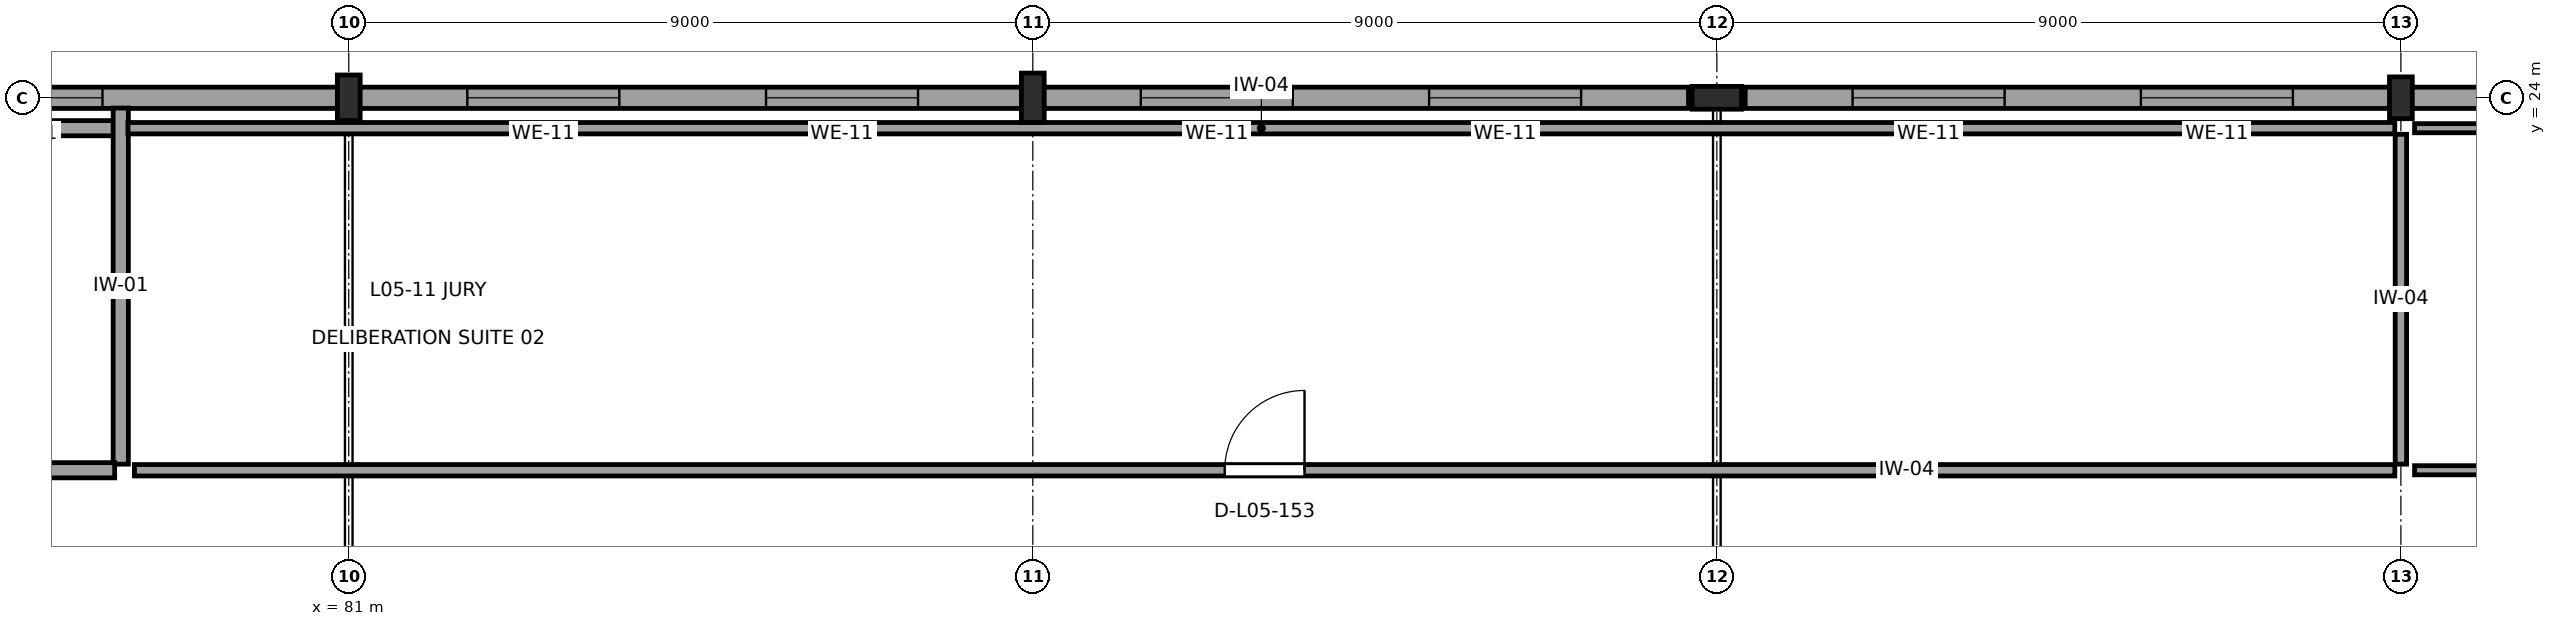
"""IFC4 building model, lengths in metres.
Left out: names, types, materials, properties, quantities, classifications, styles, units other than length and angle.
Written with IfcOpenShell. Run it as: python <this file> out.ifc"""

import sys

from ifc_helpers import new_model, si_unit, direction, frame, frame_2d, origin, origin_2d, place, context, subcontext, project, spatial, rectangle, i_section, extrude, element, fill, save


model = new_model("IFC4")
c1 = context("Model", 3, precision=1e-05, world=origin(), true_north=direction((0.0, 1.0)))
c2 = subcontext(c1, "Body", "Model", "MODEL_VIEW")
j1 = project(units=[si_unit("LENGTHUNIT", "METRE"), si_unit("PLANEANGLEUNIT", "RADIAN")], contexts=[c1])
p1 = place(None, origin())
s1 = spatial("IfcSite", under=j1, at=p1, CompositionType="ELEMENT")
p2 = place(p1, origin())
s2 = spatial("IfcBuilding", under=s1, at=p2, CompositionType="ELEMENT")
p3 = place(p2, frame((0.0, 0.0, 23.4)))
s3 = spatial("IfcBuildingStorey", under=s2, at=p3, CompositionType="ELEMENT", Elevation=23.4)
p4 = place(p3, frame((81.0, 24.0, 0.0), z_axis=(0.0, 0.0, 1.0), x_axis=(1.0, 0.0, 0.0)))
e1 = element("IfcColumn", 1, at=p4, inside=s3, PredefinedType="COLUMN", context=c2, shape_type="SweptSolid", body=[
    extrude(i_section(OverallWidth=0.3, OverallDepth=0.6, WebThickness=0.015, FlangeThickness=0.03, at=origin_2d()), origin(), (0.0, 0.0, 1.0), 4.0),
])
for number, where, z_axis, x_axis in (
    (2, (90.0, 24.0, 0.0), (0.0, 0.0, 1.0), (1.0, 0.0, 0.0)),
    (3, (99.0, 24.0, 0.0), (0.0, 0.0, 1.0), (0.0, 1.0, 0.0)),
):
    element("IfcColumn", number, at=place(p3, frame(where, z_axis=z_axis, x_axis=x_axis)), inside=s3, PredefinedType="COLUMN", context=c2, shape_type="SweptSolid", body=[
        extrude(i_section(OverallWidth=0.3, OverallDepth=0.65, WebThickness=0.016, FlangeThickness=0.031, at=origin_2d()), origin(), (0.0, 0.0, 1.0), 4.0),
    ])
p5 = place(p3, frame((108.0, 24.0, 0.0), z_axis=(0.0, 0.0, 1.0), x_axis=(1.0, 0.0, 0.0)))
e4 = element("IfcColumn", 4, at=p5, inside=s3, PredefinedType="COLUMN", context=c2, shape_type="SweptSolid", body=[
    extrude(i_section(OverallWidth=0.3, OverallDepth=0.55, WebThickness=0.015, FlangeThickness=0.029, at=origin_2d()), origin(), (0.0, 0.0, 1.0), 4.0),
])
p6 = place(p3, frame((80.942, 24.0, 0.0), z_axis=(0.0, 0.0, 1.0), x_axis=(-1.0, 0.0, 0.0)))
e5 = element("IfcWall", 5, at=p6, inside=s3, PredefinedType="SOLIDWALL", context=c2, shape_type="SweptSolid", body=[
    extrude(rectangle(XDim=8.934, YDim=0.28, at=frame_2d((4.467, 0.0))), origin(), (0.0, 0.0, 1.0), 3.315),
])
p7 = place(p6, frame((3.182, 0.0, 0.85)))
e6 = element("IfcOpeningElement", 6, at=p7, cuts=e5, PredefinedType="OPENING", context=c2, shape_type="SweptSolid", body=[
    extrude(rectangle(XDim=2.0, YDim=2.0, at=frame_2d((1.0, 1.0))), frame((0.0, 0.155, 0.0), z_axis=(0.0, -1.0, 0.0), x_axis=(1.0, 0.0, 0.0)), (0.0, 0.0, 1.0), 0.31),
])
p8 = place(p3, frame((98.627, 24.0, 0.0), z_axis=(0.0, 0.0, 1.0), x_axis=(-1.0, 0.0, 0.0)))
e7 = element("IfcWall", 7, at=p8, inside=s3, PredefinedType="SOLIDWALL", context=c2, shape_type="SweptSolid", body=[
    extrude(rectangle(XDim=8.619, YDim=0.28, at=frame_2d((4.31, 0.0))), origin(), (0.0, 0.0, 1.0), 3.315),
])
p9 = place(p8, frame((1.413, 0.0, 0.85)))
e8 = element("IfcOpeningElement", 8, at=p9, cuts=e7, PredefinedType="OPENING", context=c2, shape_type="SweptSolid", body=[
    extrude(rectangle(XDim=2.0, YDim=2.0, at=frame_2d((1.0, 1.0))), frame((0.0, 0.155, 0.0), z_axis=(0.0, -1.0, 0.0), x_axis=(1.0, 0.0, 0.0)), (0.0, 0.0, 1.0), 0.31),
])
p10 = place(p8, frame((5.206, 0.0, 0.85)))
e9 = element("IfcOpeningElement", 9, at=p10, cuts=e7, PredefinedType="OPENING", context=c2, shape_type="SweptSolid", body=[
    extrude(rectangle(XDim=2.0, YDim=2.0, at=frame_2d((1.0, 1.0))), frame((0.0, 0.155, 0.0), z_axis=(0.0, -1.0, 0.0), x_axis=(1.0, 0.0, 0.0)), (0.0, 0.0, 1.0), 0.31),
])
p11 = place(p3, frame((89.992, 24.0, 0.0), z_axis=(0.0, 0.0, 1.0), x_axis=(-1.0, 0.0, 0.0)))
e10 = element("IfcWall", 10, at=p11, inside=s3, PredefinedType="SOLIDWALL", context=c2, shape_type="SweptSolid", body=[
    extrude(rectangle(XDim=8.934, YDim=0.28, at=frame_2d((4.467, 0.0))), origin(), (0.0, 0.0, 1.0), 3.315),
])
p12 = place(p11, frame((1.502, 0.0, 0.85)))
e11 = element("IfcOpeningElement", 11, at=p12, cuts=e10, PredefinedType="OPENING", context=c2, shape_type="SweptSolid", body=[
    extrude(rectangle(XDim=2.0, YDim=2.0, at=frame_2d((1.0, 1.0))), frame((0.0, 0.155, 0.0), z_axis=(0.0, -1.0, 0.0), x_axis=(1.0, 0.0, 0.0)), (0.0, 0.0, 1.0), 0.31),
])
p13 = place(p11, frame((5.432, 0.0, 0.85)))
e12 = element("IfcOpeningElement", 12, at=p13, cuts=e10, PredefinedType="OPENING", context=c2, shape_type="SweptSolid", body=[
    extrude(rectangle(XDim=2.0, YDim=2.0, at=frame_2d((1.0, 1.0))), frame((0.0, 0.155, 0.0), z_axis=(0.0, -1.0, 0.0), x_axis=(1.0, 0.0, 0.0)), (0.0, 0.0, 1.0), 0.31),
])
p14 = place(p3, frame((116.992, 24.0, 0.0), z_axis=(0.0, 0.0, 1.0), x_axis=(-1.0, 0.0, 0.0)))
e13 = element("IfcWall", 13, at=p14, inside=s3, PredefinedType="SOLIDWALL", context=c2, shape_type="SweptSolid", body=[
    extrude(rectangle(XDim=8.984, YDim=0.28, at=frame_2d((4.492, 0.0))), origin(), (0.0, 0.0, 1.0), 2.747),
])
p15 = place(p14, frame((2.045, 0.0, 0.9)))
e14 = element("IfcOpeningElement", 14, at=p15, cuts=e13, PredefinedType="OPENING", context=c2, shape_type="SweptSolid", body=[
    extrude(rectangle(XDim=1.3, YDim=1.3, at=frame_2d((0.65, 0.65))), frame((0.0, 0.155, 0.0), z_axis=(0.0, -1.0, 0.0), x_axis=(1.0, 0.0, 0.0)), (0.0, 0.0, 1.0), 0.31),
])
p16 = place(p14, frame((5.639, 0.0, 0.9)))
e15 = element("IfcOpeningElement", 15, at=p16, cuts=e13, PredefinedType="OPENING", context=c2, shape_type="SweptSolid", body=[
    extrude(rectangle(XDim=1.3, YDim=1.3, at=frame_2d((0.65, 0.65))), frame((0.0, 0.155, 0.0), z_axis=(0.0, -1.0, 0.0), x_axis=(1.0, 0.0, 0.0)), (0.0, 0.0, 1.0), 0.31),
])
p17 = place(p3, frame((107.992, 24.0, 0.0), z_axis=(0.0, 0.0, 1.0), x_axis=(-1.0, 0.0, 0.0)))
e16 = element("IfcWall", 16, at=p17, inside=s3, PredefinedType="SOLIDWALL", context=c2, shape_type="SweptSolid", body=[
    extrude(rectangle(XDim=8.619, YDim=0.28, at=frame_2d((4.31, 0.0))), origin(), (0.0, 0.0, 1.0), 3.315),
])
p18 = place(p17, frame((1.413, 0.0, 0.85)))
e17 = element("IfcOpeningElement", 17, at=p18, cuts=e16, PredefinedType="OPENING", context=c2, shape_type="SweptSolid", body=[
    extrude(rectangle(XDim=2.0, YDim=2.0, at=frame_2d((1.0, 1.0))), frame((0.0, 0.155, 0.0), z_axis=(0.0, -1.0, 0.0), x_axis=(1.0, 0.0, 0.0)), (0.0, 0.0, 1.0), 0.31),
])
p19 = place(p17, frame((5.206, 0.0, 0.85)))
e18 = element("IfcOpeningElement", 18, at=p19, cuts=e16, PredefinedType="OPENING", context=c2, shape_type="SweptSolid", body=[
    extrude(rectangle(XDim=2.0, YDim=2.0, at=frame_2d((1.0, 1.0))), frame((0.0, 0.155, 0.0), z_axis=(0.0, -1.0, 0.0), x_axis=(1.0, 0.0, 0.0)), (0.0, 0.0, 1.0), 0.31),
])
p20 = place(p3, frame((45.008, 23.6, 0.0), z_axis=(0.0, 0.0, 1.0), x_axis=(1.0, 0.0, 0.0)))
e19 = element("IfcWall", 19, at=p20, inside=s3, PredefinedType="PARTITIONING", context=c2, shape_type="SweptSolid", body=[
    extrude(rectangle(XDim=32.912, YDim=0.2, at=frame_2d((16.456, 0.0))), origin(), (0.0, 0.0, 1.0), 3.64),
])
p21 = place(p3, frame((78.0, 23.865, 0.0), z_axis=(0.0, 0.0, 1.0), x_axis=(0.0, -1.0, 0.0)))
e20 = element("IfcWall", 20, at=p21, inside=s3, PredefinedType="PARTITIONING", context=c2, shape_type="SweptSolid", body=[
    extrude(rectangle(XDim=4.685, YDim=0.2, at=frame_2d((2.343, 0.0))), origin(), (0.0, 0.0, 1.0), 3.555),
])
p22 = place(p3, frame((77.92, 19.1, 0.0), z_axis=(0.0, 0.0, 1.0), x_axis=(-1.0, 0.0, 0.0)))
e21 = element("IfcWall", 21, at=p22, inside=s3, PredefinedType="PARTITIONING", context=c2, shape_type="SweptSolid", body=[
    extrude(rectangle(XDim=32.785, YDim=0.2, at=frame_2d((16.393, 0.0))), origin(), (0.0, 0.0, 1.0), 3.64),
])
p23 = place(p22, frame((15.442, 0.0, 0.0)))
e22 = element("IfcOpeningElement", 22, at=p23, cuts=e21, PredefinedType="OPENING", context=c2, shape_type="SweptSolid", body=[
    extrude(rectangle(XDim=1.9, YDim=2.5, at=frame_2d((0.95, 1.25))), frame((0.0, 0.115, 0.0), z_axis=(0.0, -1.0, 0.0), x_axis=(1.0, 0.0, 0.0)), (0.0, 0.0, 1.0), 0.23),
])
p24 = place(p3, frame((108.0, 23.52, 0.0), z_axis=(0.0, 0.0, 1.0), x_axis=(0.0, -1.0, 0.0)))
e23 = element("IfcWall", 23, at=p24, inside=s3, PredefinedType="PARTITIONING", context=c2, shape_type="SweptSolid", body=[
    extrude(rectangle(XDim=4.34, YDim=0.15, at=frame_2d((2.17, 0.0))), origin(), (0.0, 0.0, 1.0), 3.405),
])
p25 = place(p3, frame((107.92, 19.1, 0.0), z_axis=(0.0, 0.0, 1.0), x_axis=(-1.0, 0.0, 0.0)))
e24 = element("IfcWall", 24, at=p25, inside=s3, PredefinedType="PARTITIONING", context=c2, shape_type="SweptSolid", body=[
    extrude(rectangle(XDim=29.74, YDim=0.15, at=frame_2d((14.87, 0.0))), origin(), (0.0, 0.0, 1.0), 3.64),
])
p26 = place(p25, frame((14.345, 0.0, 0.0)))
e25 = element("IfcOpeningElement", 25, at=p26, cuts=e24, PredefinedType="OPENING", context=c2, shape_type="SweptSolid", body=[
    extrude(rectangle(XDim=1.05, YDim=2.25, at=frame_2d((0.525, 1.125))), frame((0.0, 0.09, 0.0), z_axis=(0.0, -1.0, 0.0), x_axis=(1.0, 0.0, 0.0)), (0.0, 0.0, 1.0), 0.18),
])
p27 = place(p3, frame((78.095, 23.6, 0.0), z_axis=(0.0, 0.0, 1.0), x_axis=(1.0, 0.0, 0.0)))
e26 = element("IfcWall", 26, at=p27, inside=s3, PredefinedType="PARTITIONING", context=c2, shape_type="SweptSolid", body=[
    extrude(rectangle(XDim=29.825, YDim=0.15, at=frame_2d((14.913, 0.0))), origin(), (0.0, 0.0, 1.0), 3.64),
])
p28 = place(p3, frame((147.465, 19.1, 0.0), z_axis=(0.0, 0.0, 1.0), x_axis=(-1.0, 0.0, 0.0)))
e27 = element("IfcWall", 27, at=p28, inside=s3, PredefinedType="PARTITIONING", context=c2, shape_type="SweptSolid", body=[
    extrude(rectangle(XDim=39.285, YDim=0.12, at=frame_2d((19.643, 0.0))), origin(), (0.0, 0.0, 1.0), 3.64),
])
p29 = place(p28, frame((19.192, 0.0, 0.0)))
e28 = element("IfcOpeningElement", 28, at=p29, cuts=e27, PredefinedType="OPENING", context=c2, shape_type="SweptSolid", body=[
    extrude(rectangle(XDim=0.9, YDim=2.1, at=frame_2d((0.45, 1.05))), frame((0.0, 0.075, 0.0), z_axis=(0.0, -1.0, 0.0), x_axis=(1.0, 0.0, 0.0)), (0.0, 0.0, 1.0), 0.15),
])
p30 = place(p3, frame((108.18, 23.6, 0.0), z_axis=(0.0, 0.0, 1.0), x_axis=(1.0, 0.0, 0.0)))
e29 = element("IfcWall", 29, at=p30, inside=s3, PredefinedType="PARTITIONING", context=c2, shape_type="SweptSolid", body=[
    extrude(rectangle(XDim=39.285, YDim=0.12, at=frame_2d((19.643, 0.0))), origin(), (0.0, 0.0, 1.0), 3.64),
])
p31 = place(p7, origin())
e30 = element("IfcWindow", 30, at=p31, inside=s3, PartitioningType="SINGLE_PANEL", PredefinedType="WINDOW", context=c2, shape_type="SweptSolid", body=[
    extrude(rectangle(XDim=2.0, YDim=2.0, at=frame_2d((1.0, 1.0))), frame((0.0, 0.03, 0.0), z_axis=(0.0, -1.0, 0.0), x_axis=(1.0, 0.0, 0.0)), (0.0, 0.0, 1.0), 0.06),
])
fill(e6, e30)
p32 = place(p9, origin())
e31 = element("IfcWindow", 31, at=p32, inside=s3, PartitioningType="SINGLE_PANEL", PredefinedType="WINDOW", context=c2, shape_type="SweptSolid", body=[
    extrude(rectangle(XDim=2.0, YDim=2.0, at=frame_2d((1.0, 1.0))), frame((0.0, 0.03, 0.0), z_axis=(0.0, -1.0, 0.0), x_axis=(1.0, 0.0, 0.0)), (0.0, 0.0, 1.0), 0.06),
])
fill(e8, e31)
p33 = place(p10, origin())
e32 = element("IfcWindow", 32, at=p33, inside=s3, PartitioningType="SINGLE_PANEL", PredefinedType="WINDOW", context=c2, shape_type="SweptSolid", body=[
    extrude(rectangle(XDim=2.0, YDim=2.0, at=frame_2d((1.0, 1.0))), frame((0.0, 0.03, 0.0), z_axis=(0.0, -1.0, 0.0), x_axis=(1.0, 0.0, 0.0)), (0.0, 0.0, 1.0), 0.06),
])
fill(e9, e32)
p34 = place(p12, origin())
e33 = element("IfcWindow", 33, at=p34, inside=s3, PartitioningType="SINGLE_PANEL", PredefinedType="WINDOW", context=c2, shape_type="SweptSolid", body=[
    extrude(rectangle(XDim=2.0, YDim=2.0, at=frame_2d((1.0, 1.0))), frame((0.0, 0.03, 0.0), z_axis=(0.0, -1.0, 0.0), x_axis=(1.0, 0.0, 0.0)), (0.0, 0.0, 1.0), 0.06),
])
fill(e11, e33)
p35 = place(p13, origin())
e34 = element("IfcWindow", 34, at=p35, inside=s3, PartitioningType="SINGLE_PANEL", PredefinedType="WINDOW", context=c2, shape_type="SweptSolid", body=[
    extrude(rectangle(XDim=2.0, YDim=2.0, at=frame_2d((1.0, 1.0))), frame((0.0, 0.03, 0.0), z_axis=(0.0, -1.0, 0.0), x_axis=(1.0, 0.0, 0.0)), (0.0, 0.0, 1.0), 0.06),
])
fill(e12, e34)
p36 = place(p18, origin())
e35 = element("IfcWindow", 35, at=p36, inside=s3, PartitioningType="SINGLE_PANEL", PredefinedType="WINDOW", context=c2, shape_type="SweptSolid", body=[
    extrude(rectangle(XDim=2.0, YDim=2.0, at=frame_2d((1.0, 1.0))), frame((0.0, 0.03, 0.0), z_axis=(0.0, -1.0, 0.0), x_axis=(1.0, 0.0, 0.0)), (0.0, 0.0, 1.0), 0.06),
])
fill(e17, e35)
p37 = place(p19, origin())
e36 = element("IfcWindow", 36, at=p37, inside=s3, PartitioningType="SINGLE_PANEL", PredefinedType="WINDOW", context=c2, shape_type="SweptSolid", body=[
    extrude(rectangle(XDim=2.0, YDim=2.0, at=frame_2d((1.0, 1.0))), frame((0.0, 0.03, 0.0), z_axis=(0.0, -1.0, 0.0), x_axis=(1.0, 0.0, 0.0)), (0.0, 0.0, 1.0), 0.06),
])
fill(e18, e36)
p38 = place(p26, frame((1.05, 0.0, 0.0), z_axis=(0.0, 0.0, 1.0), x_axis=(-1.0, 0.0, 0.0)))
e37 = element("IfcDoor", 37, at=p38, inside=s3, OperationType="SINGLE_SWING_LEFT", PredefinedType="DOOR", context=c2, shape_type="SweptSolid", body=[
    extrude(rectangle(XDim=1.05, YDim=2.25, at=frame_2d((0.525, 1.125))), frame((0.0, 0.025, 0.0), z_axis=(0.0, -1.0, 0.0), x_axis=(1.0, 0.0, 0.0)), (0.0, 0.0, 1.0), 0.05),
])
fill(e25, e37)
save(model, sys.argv[1])
